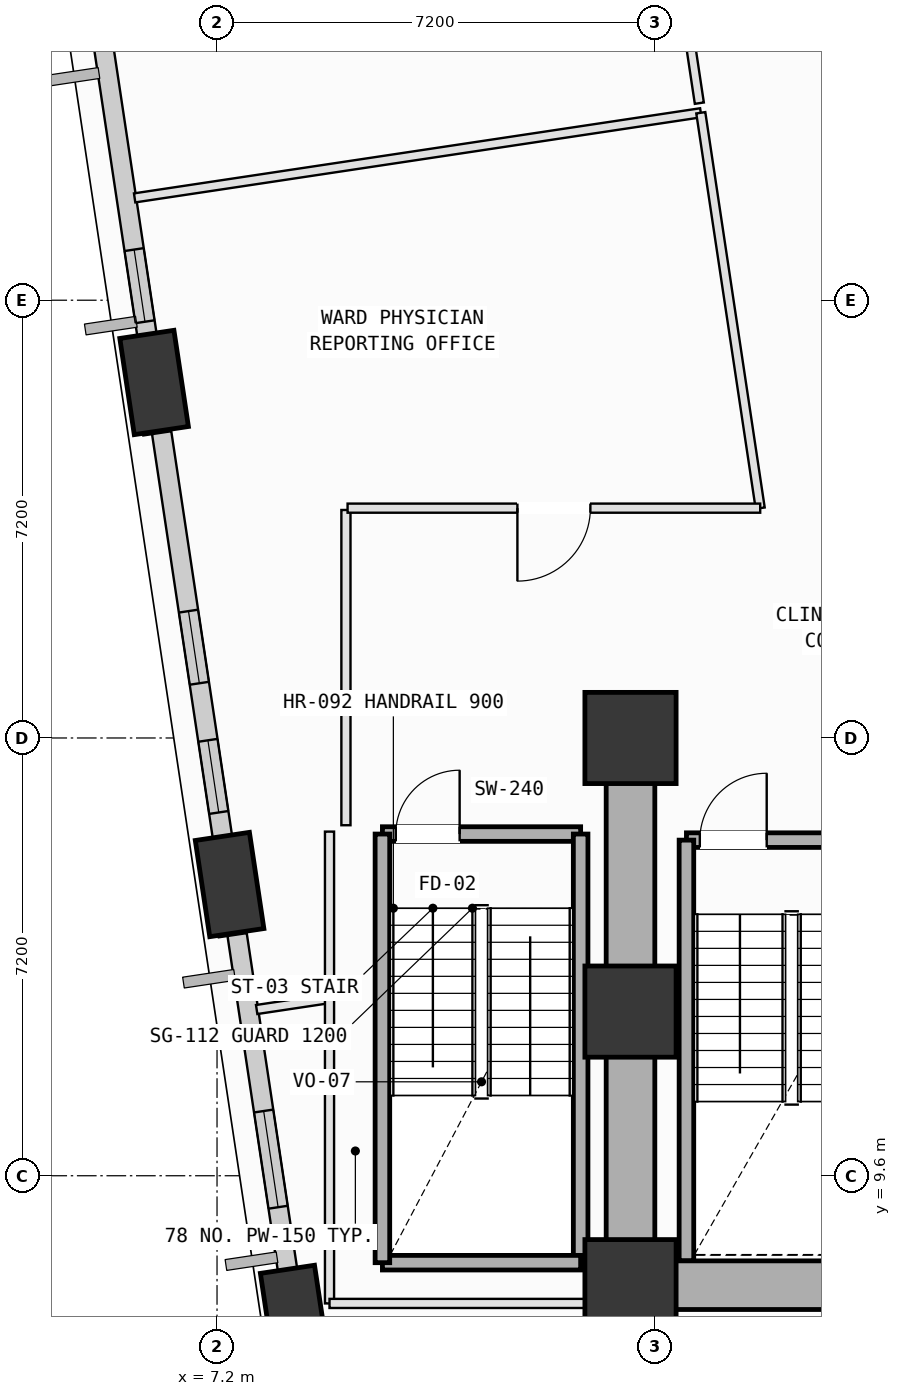
"""IFC4 building model, lengths in metres.
Left out: names, types, materials, properties, quantities, classifications, styles, units other than length and angle.
Written with IfcOpenShell. Run it as: python <this file> out.ifc"""

import sys

from ifc_helpers import new_model, si_unit, direction, frame, frame_2d, origin, origin_2d, place, context, subcontext, project, spatial, rectangle, extrude, element, fill, save


model = new_model("IFC4")
c1 = context("Model", 3, precision=1e-05, world=origin(), true_north=direction((0.0, 1.0)))
c2 = subcontext(c1, "Body", "Model", "MODEL_VIEW")
j1 = project(units=[si_unit("LENGTHUNIT", "METRE"), si_unit("PLANEANGLEUNIT", "RADIAN")], contexts=[c1])
p1 = place(None, origin())
s1 = spatial("IfcSite", under=j1, at=p1, CompositionType="ELEMENT")
p2 = place(p1, origin())
s2 = spatial("IfcBuilding", under=s1, at=p2, CompositionType="ELEMENT")
p3 = place(p2, frame((0.0, 0.0, 59.0)))
s3 = spatial("IfcBuildingStorey", under=s2, at=p3, CompositionType="ELEMENT", Elevation=59.0)
for number, where, z_axis, x_axis in (
    (1, (14.0, 7.8, 0.0), (0.0, 0.0, 1.0), (1.0, 0.0, 0.0)),
    (2, (14.0, 12.3, 0.0), (0.0, 0.0, 1.0), (1.0, 0.0, 0.0)),
    (3, (14.0, 16.8, 0.0), (0.0, 0.0, 1.0), (1.0, 0.0, 0.0)),
):
    element("IfcColumn", number, at=place(p3, frame(where, z_axis=z_axis, x_axis=x_axis)), inside=s3, PredefinedType="COLUMN", context=c2, shape_type="SweptSolid", body=[
        extrude(rectangle(XDim=1.5, YDim=1.5, at=origin_2d()), origin(), (0.0, 0.0, 1.0), 4.0),
    ])
p4 = place(p3, frame((5.177, 29.223, 0.002), z_axis=(-0.017226797387, -0.117130090682, 0.99296715923), x_axis=(-0.00421044589, 0.993114222476, 0.117074391996)))
e4 = element("IfcColumn", 4, at=p4, inside=s3, PredefinedType="COLUMN", context=c2, shape_type="SweptSolid", body=[
    extrude(rectangle(XDim=1.6, YDim=0.9, at=origin_2d()), origin(), (0.0, 0.0, 1.0), 4.025),
])
p5 = place(p3, frame((6.165, 22.647, 0.002), z_axis=(0.009771720065, -0.112890679013, 0.993559363138), x_axis=(-0.232847622535, 0.966036229654, 0.112053503628)))
e5 = element("IfcColumn", 5, at=p5, inside=s3, PredefinedType="COLUMN", context=c2, shape_type="SweptSolid", body=[
    extrude(rectangle(XDim=1.6, YDim=0.9, at=origin_2d()), origin(), (0.0, 0.0, 1.0), 4.022),
])
p6 = place(p3, frame((7.407, 14.39, 0.002), z_axis=(0.04374655457, -0.107455129187, 0.993247015689), x_axis=(-0.508054277806, 0.853649814663, 0.114729441421)))
e6 = element("IfcColumn", 6, at=p6, inside=s3, PredefinedType="COLUMN", context=c2, shape_type="SweptSolid", body=[
    extrude(rectangle(XDim=1.6, YDim=0.9, at=origin_2d()), origin(), (0.0, 0.0, 1.0), 4.024),
])
p7 = place(p3, frame((8.477, 7.27, 0.002), z_axis=(0.072963058772, -0.102717927424, 0.992030956896), x_axis=(-0.689304816456, 0.713677219144, 0.124594128617)))
e7 = element("IfcColumn", 7, at=p7, inside=s3, PredefinedType="COLUMN", context=c2, shape_type="SweptSolid", body=[
    extrude(rectangle(XDim=1.6, YDim=0.9, at=origin_2d()), origin(), (0.0, 0.0, 1.0), 4.029),
])
p8 = place(p3, frame((6.109, 23.023, 0.0), z_axis=(0.0, 0.0, 1.0), x_axis=(-0.148652196075, 0.988889541153, 0.0)))
e8 = element("IfcWall", 8, at=p8, inside=s3, PredefinedType="SOLIDWALL", context=c2, shape_type="SweptSolid", body=[
    extrude(rectangle(XDim=5.438, YDim=0.32, at=frame_2d((2.719, 0.0))), origin(), (0.0, 0.0, 1.0), 3.165),
])
p9 = place(p8, frame((0.63, 0.0, 0.75)))
e9 = element("IfcOpeningElement", 9, at=p9, cuts=e8, PredefinedType="OPENING", context=c2, shape_type="SweptSolid", body=[
    extrude(rectangle(XDim=1.2, YDim=1.75, at=frame_2d((0.6, 0.875))), frame((0.0, 0.17, 0.0), z_axis=(0.0, -1.0, 0.0), x_axis=(1.0, 0.0, 0.0)), (0.0, 0.0, 1.0), 0.34),
])
p10 = place(p3, frame((7.35, 14.764, 0.0), z_axis=(0.0, 0.0, 1.0), x_axis=(-0.148678365996, 0.988885606875, 0.0)))
e10 = element("IfcWall", 10, at=p10, inside=s3, PredefinedType="SOLIDWALL", context=c2, shape_type="SweptSolid", body=[
    extrude(rectangle(XDim=7.136, YDim=0.32, at=frame_2d((3.568, 0.0))), origin(), (0.0, 0.0, 1.0), 3.165),
])
p11 = place(p10, frame((2.969, 0.0, 0.75)))
e11 = element("IfcOpeningElement", 11, at=p11, cuts=e10, PredefinedType="OPENING", context=c2, shape_type="SweptSolid", body=[
    extrude(rectangle(XDim=1.2, YDim=1.75, at=frame_2d((0.6, 0.875))), frame((0.0, 0.17, 0.0), z_axis=(0.0, -1.0, 0.0), x_axis=(1.0, 0.0, 0.0)), (0.0, 0.0, 1.0), 0.34),
])
p12 = place(p10, frame((0.82, 0.0, 0.75)))
e12 = element("IfcOpeningElement", 12, at=p12, cuts=e10, PredefinedType="OPENING", context=c2, shape_type="SweptSolid", body=[
    extrude(rectangle(XDim=1.2, YDim=1.75, at=frame_2d((0.6, 0.875))), frame((0.0, 0.17, 0.0), z_axis=(0.0, -1.0, 0.0), x_axis=(1.0, 0.0, 0.0)), (0.0, 0.0, 1.0), 0.34),
])
p13 = place(p3, frame((8.422, 7.636, 0.0), z_axis=(0.0, 0.0, 1.0), x_axis=(-0.148706716191, 0.988881344024, 0.0)))
e13 = element("IfcWall", 13, at=p13, inside=s3, PredefinedType="SOLIDWALL", context=c2, shape_type="SweptSolid", body=[
    extrude(rectangle(XDim=5.997, YDim=0.32, at=frame_2d((2.999, 0.0))), origin(), (0.0, 0.0, 1.0), 3.165),
])
p14 = place(p13, frame((1.462, 0.0, 0.75)))
e14 = element("IfcOpeningElement", 14, at=p14, cuts=e13, PredefinedType="OPENING", context=c2, shape_type="SweptSolid", body=[
    extrude(rectangle(XDim=1.6, YDim=1.95, at=frame_2d((0.8, 0.975))), frame((0.0, 0.17, 0.0), z_axis=(0.0, -1.0, 0.0), x_axis=(1.0, 0.0, 0.0)), (0.0, 0.0, 1.0), 0.34),
])
p15 = place(p3, frame((14.92, 15.12, 0.0), z_axis=(0.0, 0.0, 1.0), x_axis=(1.0, 0.0, 0.0)))
e15 = element("IfcWall", 15, at=p15, inside=s3, PredefinedType="SOLIDWALL", context=c2, shape_type="SweptSolid", body=[
    extrude(rectangle(XDim=3.46, YDim=0.24, at=frame_2d((1.73, 0.0))), origin(), (0.0, 0.0, 1.0), 3.78),
])
p16 = place(p15, frame((0.22, 0.0, 0.0)))
e16 = element("IfcOpeningElement", 16, at=p16, cuts=e15, PredefinedType="OPENING", context=c2, shape_type="SweptSolid", body=[
    extrude(rectangle(XDim=1.1, YDim=2.15, at=frame_2d((0.55, 1.075))), frame((0.0, 0.13, 0.0), z_axis=(0.0, -1.0, 0.0), x_axis=(1.0, 0.0, 0.0)), (0.0, 0.0, 1.0), 0.26),
])
p17 = place(p3, frame((14.92, 8.2, 0.0), z_axis=(0.0, 0.0, 1.0), x_axis=(0.0, 1.0, 0.0)))
e17 = element("IfcWall", 17, at=p17, inside=s3, PredefinedType="SOLIDWALL", context=c2, shape_type="SweptSolid", body=[
    extrude(rectangle(XDim=6.92, YDim=0.24, at=frame_2d((3.46, 0.0))), origin(), (0.0, 0.0, 1.0), 3.78),
])
p18 = place(p3, frame((9.92, 15.22, 0.0), z_axis=(0.0, 0.0, 1.0), x_axis=(1.0, 0.0, 0.0)))
e18 = element("IfcWall", 18, at=p18, inside=s3, PredefinedType="SOLIDWALL", context=c2, shape_type="SweptSolid", body=[
    extrude(rectangle(XDim=3.26, YDim=0.24, at=frame_2d((1.63, 0.0))), origin(), (0.0, 0.0, 1.0), 3.78),
])
p19 = place(p18, frame((0.22, 0.0, 0.0)))
e19 = element("IfcOpeningElement", 19, at=p19, cuts=e18, PredefinedType="OPENING", context=c2, shape_type="SweptSolid", body=[
    extrude(rectangle(XDim=1.05, YDim=2.15, at=frame_2d((0.525, 1.075))), frame((0.0, 0.13, 0.0), z_axis=(0.0, -1.0, 0.0), x_axis=(1.0, 0.0, 0.0)), (0.0, 0.0, 1.0), 0.26),
])
p20 = place(p3, frame((13.18, 15.22, 0.0), z_axis=(0.0, 0.0, 1.0), x_axis=(0.0, -1.0, 0.0)))
e20 = element("IfcWall", 20, at=p20, inside=s3, PredefinedType="SOLIDWALL", context=c2, shape_type="SweptSolid", body=[
    extrude(rectangle(XDim=7.05, YDim=0.24, at=frame_2d((3.525, 0.0))), origin(), (0.0, 0.0, 1.0), 3.78),
])
p21 = place(p3, frame((13.18, 8.17, 0.0), z_axis=(0.0, 0.0, 1.0), x_axis=(-1.0, 0.0, 0.0)))
e21 = element("IfcWall", 21, at=p21, inside=s3, PredefinedType="SOLIDWALL", context=c2, shape_type="SweptSolid", body=[
    extrude(rectangle(XDim=3.26, YDim=0.24, at=frame_2d((1.63, 0.0))), origin(), (0.0, 0.0, 1.0), 3.78),
])
p22 = place(p3, frame((9.92, 8.17, 0.0), z_axis=(0.0, 0.0, 1.0), x_axis=(0.0, 1.0, 0.0)))
e22 = element("IfcWall", 22, at=p22, inside=s3, PredefinedType="SOLIDWALL", context=c2, shape_type="SweptSolid", body=[
    extrude(rectangle(XDim=7.05, YDim=0.24, at=frame_2d((3.525, 0.0))), origin(), (0.0, 0.0, 1.0), 3.78),
])
p23 = place(p3, frame((14.0, 7.8, 0.0), z_axis=(0.0, 0.0, 1.0), x_axis=(1.0, 0.0, 0.0)))
e23 = element("IfcWall", 23, at=p23, inside=s3, PredefinedType="SHEAR", context=c2, shape_type="SweptSolid", body=[
    extrude(rectangle(XDim=10.8, YDim=0.8, at=frame_2d((5.4, 0.0))), origin(), (0.0, 0.0, 1.0), 3.78),
])
p24 = place(p3, frame((14.0, 16.8, 0.0), z_axis=(0.0, 0.0, 1.0), x_axis=(0.0, -1.0, 0.0)))
e24 = element("IfcWall", 24, at=p24, inside=s3, PredefinedType="SHEAR", context=c2, shape_type="SweptSolid", body=[
    extrude(rectangle(XDim=9.0, YDim=0.8, at=frame_2d((4.5, 0.0))), origin(), (0.0, 0.0, 1.0), 3.78),
])
p25 = place(p3, frame((7.852, 12.334, 0.0), z_axis=(0.0, 0.0, 1.0), x_axis=(0.988908249039, 0.14852769096, 0.0)))
e25 = element("IfcWall", 25, at=p25, inside=s3, PredefinedType="PARTITIONING", context=c2, shape_type="SweptSolid", body=[
    extrude(rectangle(XDim=1.211, YDim=0.15, at=frame_2d((0.606, 0.0))), origin(), (0.0, 0.0, 1.0), 3.78),
])
p26 = place(p3, frame((9.05, 12.514, 0.0), z_axis=(0.0, 0.0, 1.0), x_axis=(0.0, -1.0, 0.0)))
e26 = element("IfcWall", 26, at=p26, inside=s3, PredefinedType="PARTITIONING", context=c2, shape_type="SweptSolid", body=[
    extrude(rectangle(XDim=5.014, YDim=0.15, at=frame_2d((2.507, 0.0))), origin(), (0.0, 0.0, 1.0), 3.165),
])
p27 = place(p3, frame((9.05, 7.5, 0.0), z_axis=(0.0, 0.0, 1.0), x_axis=(1.0, 0.0, 0.0)))
e27 = element("IfcWall", 27, at=p27, inside=s3, PredefinedType="PARTITIONING", context=c2, shape_type="SweptSolid", body=[
    extrude(rectangle(XDim=4.95, YDim=0.15, at=frame_2d((2.475, 0.0))), origin(), (0.0, 0.0, 1.0), 3.78),
])
p28 = place(p3, frame((8.723, 6.474, 0.0), z_axis=(0.0, 0.0, 1.0), x_axis=(-0.149030183966, 0.98883264725, 0.0)))
e28 = element("IfcWall", 28, at=p28, inside=s3, PredefinedType="PARTITIONING", context=c2, shape_type="SweptSolid", body=[
    extrude(rectangle(XDim=1.194, YDim=0.15, at=frame_2d((0.597, 0.0))), origin(), (0.0, 0.0, 1.0), 3.165),
])
p29 = place(p3, frame((9.32, 20.55, 0.0), z_axis=(0.0, 0.0, 1.0), x_axis=(0.0, -1.0, 0.0)))
e29 = element("IfcWall", 29, at=p29, inside=s3, PredefinedType="PARTITIONING", context=c2, shape_type="SweptSolid", body=[
    extrude(rectangle(XDim=5.185, YDim=0.15, at=frame_2d((2.593, 0.0))), origin(), (0.0, 0.0, 1.0), 3.78),
])
p30 = place(p3, frame((9.05, 15.26, 0.0), z_axis=(0.0, 0.0, 1.0), x_axis=(0.0, -1.0, 0.0)))
e30 = element("IfcWall", 30, at=p30, inside=s3, PredefinedType="PARTITIONING", context=c2, shape_type="SweptSolid", body=[
    extrude(rectangle(XDim=2.484, YDim=0.15, at=frame_2d((1.242, 0.0))), origin(), (0.0, 0.0, 1.0), 3.78),
])
p31 = place(p3, frame((9.05, 12.776, 0.0), z_axis=(0.0, 0.0, 1.0), x_axis=(-0.988891896526, -0.148636526418, 0.0)))
e31 = element("IfcWall", 31, at=p31, inside=s3, PredefinedType="PARTITIONING", context=c2, shape_type="SweptSolid", body=[
    extrude(rectangle(XDim=1.25, YDim=0.15, at=frame_2d((0.625, 0.0))), origin(), (0.0, 0.0, 1.0), 3.78),
])
p32 = place(p3, frame((7.303, 13.533, 0.0), z_axis=(0.0, 0.0, 1.0), x_axis=(-0.148646187536, 0.988890444352, 0.0)))
e32 = element("IfcWall", 32, at=p32, inside=s3, PredefinedType="PARTITIONING", context=c2, shape_type="SweptSolid", body=[
    extrude(rectangle(XDim=1.21, YDim=0.15, at=frame_2d((0.605, 0.0))), origin(), (0.0, 0.0, 1.0), 3.165),
])
p33 = place(p3, frame((6.062, 21.787, 0.0), z_axis=(0.0, 0.0, 1.0), x_axis=(-0.148841369981, 0.988861085584, 0.0)))
e33 = element("IfcWall", 33, at=p33, inside=s3, PredefinedType="PARTITIONING", context=c2, shape_type="SweptSolid", body=[
    extrude(rectangle(XDim=1.215, YDim=0.15, at=frame_2d((0.608, 0.0))), origin(), (0.0, 0.0, 1.0), 3.165),
])
p34 = place(p3, frame((5.845, 25.683, 0.0), z_axis=(0.0, 0.0, 1.0), x_axis=(0.988885704997, 0.148677713369, 0.0)))
e34 = element("IfcWall", 34, at=p34, inside=s3, PredefinedType="PARTITIONING", context=c2, shape_type="SweptSolid", body=[
    extrude(rectangle(XDim=9.416, YDim=0.15, at=frame_2d((4.708, 0.0))), origin(), (0.0, 0.0, 1.0), 3.78),
])
p35 = place(p3, frame((15.156, 27.083, 0.0), z_axis=(0.0, 0.0, 1.0), x_axis=(0.148580091248, -0.988900377432, 0.0)))
e35 = element("IfcWall", 35, at=p35, inside=s3, PredefinedType="PARTITIONING", context=c2, shape_type="SweptSolid", body=[
    extrude(rectangle(XDim=6.576, YDim=0.15, at=frame_2d((3.288, 0.0))), origin(), (0.0, 0.0, 1.0), 3.78),
])
p36 = place(p3, frame((16.133, 20.58, 0.0), z_axis=(0.0, 0.0, 1.0), x_axis=(-1.0, 0.0, 0.0)))
e36 = element("IfcWall", 36, at=p36, inside=s3, PredefinedType="PARTITIONING", context=c2, shape_type="SweptSolid", body=[
    extrude(rectangle(XDim=6.786, YDim=0.15, at=frame_2d((3.393, 0.0))), origin(), (0.0, 0.0, 1.0), 3.78),
])
p37 = place(p36, frame((2.793, 0.0, 0.0)))
e37 = element("IfcOpeningElement", 37, at=p37, cuts=e36, PredefinedType="OPENING", context=c2, shape_type="SweptSolid", body=[
    extrude(rectangle(XDim=1.2, YDim=2.15, at=frame_2d((0.6, 1.075))), frame((0.0, 0.085, 0.0), z_axis=(0.0, -1.0, 0.0), x_axis=(1.0, 0.0, 0.0)), (0.0, 0.0, 1.0), 0.17),
])
p38 = place(p3, frame((13.163, 40.334, 0.0), z_axis=(0.0, 0.0, 1.0), x_axis=(0.148712834823, -0.988880423893, 0.0)))
e38 = element("IfcWall", 38, at=p38, inside=s3, PredefinedType="PARTITIONING", context=c2, shape_type="SweptSolid", body=[
    extrude(rectangle(XDim=13.24, YDim=0.15, at=frame_2d((6.62, 0.0))), origin(), (0.0, 0.0, 1.0), 2.865),
])
p39 = place(p38, frame((6.02, 0.0, 0.0)))
e39 = element("IfcOpeningElement", 39, at=p39, cuts=e38, PredefinedType="OPENING", context=c2, shape_type="SweptSolid", body=[
    extrude(rectangle(XDim=1.2, YDim=2.15, at=frame_2d((0.6, 1.075))), frame((0.0, 0.085, 0.0), z_axis=(0.0, -1.0, 0.0), x_axis=(1.0, 0.0, 0.0)), (0.0, 0.0, 1.0), 0.17),
])
p40 = place(p3, frame((18.381, 24.797, 0.0), z_axis=(0.0, 0.0, 1.0), x_axis=(-0.148671093469, 0.988886700268, 0.0)))
e40 = element("IfcWall", 40, at=p40, inside=s3, PredefinedType="PARTITIONING", context=c2, shape_type="SweptSolid", body=[
    extrude(rectangle(XDim=8.341, YDim=0.15, at=frame_2d((4.17, 0.0))), origin(), (0.0, 0.0, 1.0), 3.78),
])
p41 = place(p40, frame((3.57, 0.0, 0.0)))
e41 = element("IfcOpeningElement", 41, at=p41, cuts=e40, PredefinedType="OPENING", context=c2, shape_type="SweptSolid", body=[
    extrude(rectangle(XDim=1.2, YDim=2.15, at=frame_2d((0.6, 1.075))), frame((0.0, 0.085, 0.0), z_axis=(0.0, -1.0, 0.0), x_axis=(1.0, 0.0, 0.0)), (0.0, 0.0, 1.0), 0.17),
])
p42 = place(p9, origin())
e42 = element("IfcWindow", 42, at=p42, inside=s3, PartitioningType="SINGLE_PANEL", PredefinedType="WINDOW", context=c2, shape_type="SweptSolid", body=[
    extrude(rectangle(XDim=1.2, YDim=1.75, at=frame_2d((0.6, 0.875))), frame((0.0, 0.03, 0.0), z_axis=(0.0, -1.0, 0.0), x_axis=(1.0, 0.0, 0.0)), (0.0, 0.0, 1.0), 0.06),
])
fill(e9, e42)
p43 = place(p11, origin())
e43 = element("IfcWindow", 43, at=p43, inside=s3, PartitioningType="SINGLE_PANEL", PredefinedType="WINDOW", context=c2, shape_type="SweptSolid", body=[
    extrude(rectangle(XDim=1.2, YDim=1.75, at=frame_2d((0.6, 0.875))), frame((0.0, 0.03, 0.0), z_axis=(0.0, -1.0, 0.0), x_axis=(1.0, 0.0, 0.0)), (0.0, 0.0, 1.0), 0.06),
])
fill(e11, e43)
p44 = place(p12, origin())
e44 = element("IfcWindow", 44, at=p44, inside=s3, PartitioningType="SINGLE_PANEL", PredefinedType="WINDOW", context=c2, shape_type="SweptSolid", body=[
    extrude(rectangle(XDim=1.2, YDim=1.75, at=frame_2d((0.6, 0.875))), frame((0.0, 0.03, 0.0), z_axis=(0.0, -1.0, 0.0), x_axis=(1.0, 0.0, 0.0)), (0.0, 0.0, 1.0), 0.06),
])
fill(e12, e44)
p45 = place(p14, origin())
e45 = element("IfcWindow", 45, at=p45, inside=s3, PartitioningType="SINGLE_PANEL", PredefinedType="WINDOW", context=c2, shape_type="SweptSolid", body=[
    extrude(rectangle(XDim=1.6, YDim=1.95, at=frame_2d((0.8, 0.975))), frame((0.0, 0.03, 0.0), z_axis=(0.0, -1.0, 0.0), x_axis=(1.0, 0.0, 0.0)), (0.0, 0.0, 1.0), 0.06),
])
fill(e14, e45)
p46 = place(p16, origin())
e46 = element("IfcDoor", 46, at=p46, inside=s3, OperationType="SINGLE_SWING_RIGHT", PredefinedType="DOOR", context=c2, shape_type="SweptSolid", body=[
    extrude(rectangle(XDim=1.1, YDim=2.15, at=frame_2d((0.55, 1.075))), frame((0.0, 0.025, 0.0), z_axis=(0.0, -1.0, 0.0), x_axis=(1.0, 0.0, 0.0)), (0.0, 0.0, 1.0), 0.05),
])
fill(e16, e46)
p47 = place(p19, origin())
e47 = element("IfcDoor", 47, at=p47, inside=s3, OperationType="SINGLE_SWING_RIGHT", PredefinedType="DOOR", context=c2, shape_type="SweptSolid", body=[
    extrude(rectangle(XDim=1.05, YDim=2.15, at=frame_2d((0.525, 1.075))), frame((0.0, 0.025, 0.0), z_axis=(0.0, -1.0, 0.0), x_axis=(1.0, 0.0, 0.0)), (0.0, 0.0, 1.0), 0.05),
])
fill(e19, e47)
p48 = place(p37, origin())
e48 = element("IfcDoor", 48, at=p48, inside=s3, OperationType="SINGLE_SWING_RIGHT", PredefinedType="DOOR", context=c2, shape_type="SweptSolid", body=[
    extrude(rectangle(XDim=1.2, YDim=2.15, at=frame_2d((0.6, 1.075))), frame((0.0, 0.025, 0.0), z_axis=(0.0, -1.0, 0.0), x_axis=(1.0, 0.0, 0.0)), (0.0, 0.0, 1.0), 0.05),
])
fill(e37, e48)
save(model, sys.argv[1])
